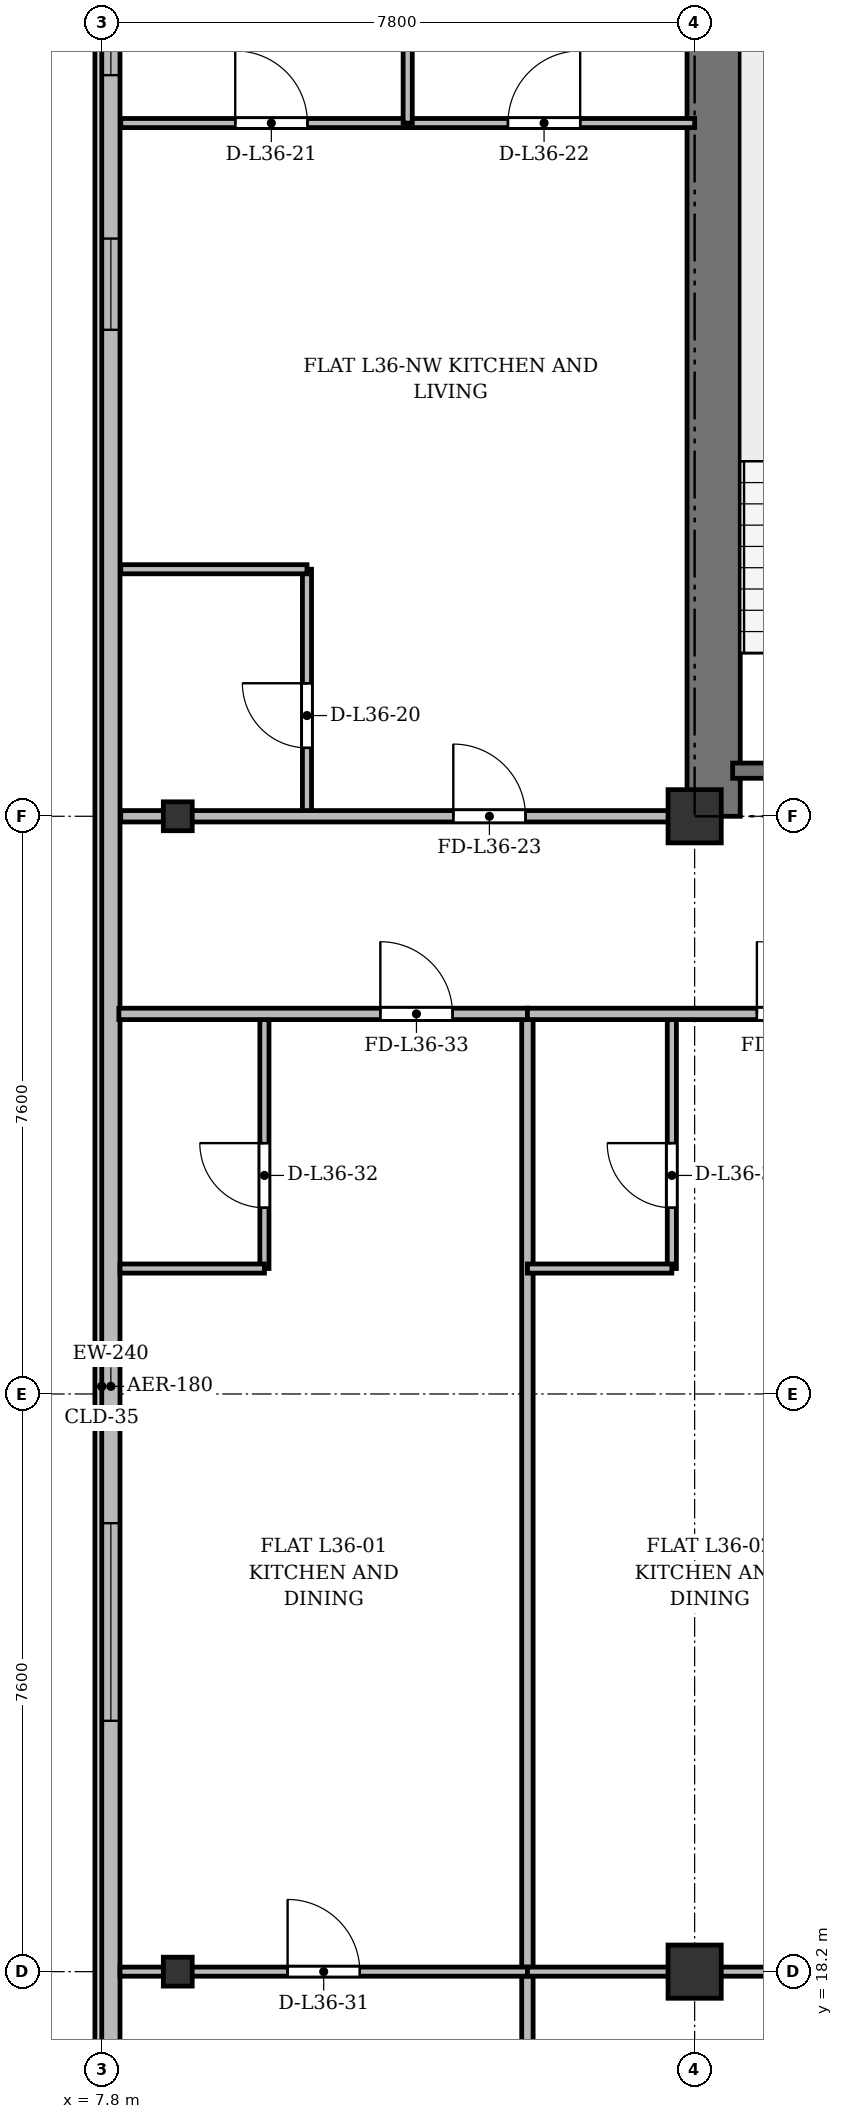
"""IFC4 building model, lengths in metres.
Left out: names, types, materials, properties, quantities, classifications, styles, units other than length and angle.
Written with IfcOpenShell. Run it as: python <this file> out.ifc"""

import sys

from ifc_helpers import new_model, si_unit, direction, frame, frame_2d, origin, origin_2d, place, context, subcontext, project, spatial, rectangle, i_section, extrude, source, transform, mapped, element, fill, save


model = new_model("IFC4")
c1 = context("Model", 3, precision=1e-05, world=origin(), true_north=direction((0.0, 1.0)))
c2 = subcontext(c1, "Body", "Model", "MODEL_VIEW")
j1 = project(units=[si_unit("LENGTHUNIT", "METRE"), si_unit("PLANEANGLEUNIT", "RADIAN")], contexts=[c1])
p1 = place(None, origin())
s1 = spatial("IfcSite", under=j1, at=p1, CompositionType="ELEMENT")
p2 = place(p1, origin())
s2 = spatial("IfcBuilding", under=s1, at=p2, CompositionType="ELEMENT")
p3 = place(p2, frame((0.0, 0.0, 139.3)))
s3 = spatial("IfcBuildingStorey", under=s2, at=p3, CompositionType="ELEMENT", Elevation=139.3)
m1 = source(origin(), c2, "Body", "SweptSolid", [
    extrude(i_section(OverallWidth=0.38, OverallDepth=0.38, WebThickness=0.02, FlangeThickness=0.03, at=origin_2d()), origin(), (0.0, 0.0, 1.0), 3.6),
])
for number, where, z_axis, x_axis in (
    (1, (8.8, 18.2, 0.0), (0.0, 0.0, 1.0), (1.0, 0.0, 0.0)),
    (2, (8.8, 33.4, 0.0), (0.0, 0.0, 1.0), (1.0, 0.0, 0.0)),
):
    element("IfcColumn", number, at=place(p3, frame(where, z_axis=z_axis, x_axis=x_axis)), inside=s3, PredefinedType="COLUMN", context=c2, shape_type="MappedRepresentation", body=[
        mapped(m1, transform((0.0, 0.0, 0.0), x_axis=(1.0, 0.0, 0.0), y_axis=(0.0, 1.0, 0.0), z_axis=(0.0, 0.0, 1.0), scale=1.0)),
    ])
m2 = source(origin(), c2, "Body", "SweptSolid", [
    extrude(rectangle(XDim=0.7, YDim=0.7, at=origin_2d()), origin(), (0.0, 0.0, 1.0), 3.6),
])
for number, where, z_axis, x_axis in (
    (3, (15.6, 18.2, 0.0), (0.0, 0.0, 1.0), (1.0, 0.0, 0.0)),
    (4, (15.6, 33.4, 0.0), (0.0, 0.0, 1.0), (1.0, 0.0, 0.0)),
):
    element("IfcColumn", number, at=place(p3, frame(where, z_axis=z_axis, x_axis=x_axis)), inside=s3, PredefinedType="COLUMN", context=c2, shape_type="MappedRepresentation", body=[
        mapped(m2, transform((0.0, 0.0, 0.0), x_axis=(1.0, 0.0, 0.0), y_axis=(0.0, 1.0, 0.0), z_axis=(0.0, 0.0, 1.0), scale=1.0)),
    ])
p4 = place(p3, frame((7.92, 6.3, 0.0), z_axis=(0.0, 0.0, 1.0), x_axis=(0.0, 1.0, 0.0)))
e5 = element("IfcWall", 5, at=p4, inside=s3, PredefinedType="SOLIDWALL", context=c2, shape_type="SweptSolid", body=[
    extrude(rectangle(XDim=39.2, YDim=0.24, at=frame_2d((19.6, 0.0))), origin(), (0.0, 0.0, 1.0), 3.35),
])
p5 = place(p4, frame((1.45, 0.0, 0.92)))
e6 = element("IfcOpeningElement", 6, at=p5, cuts=e5, PredefinedType="OPENING", context=c2, shape_type="SweptSolid", body=[
    extrude(rectangle(XDim=1.2, YDim=1.65, at=frame_2d((0.6, 0.825))), frame((0.0, 0.13, 0.0), z_axis=(0.0, -1.0, 0.0), x_axis=(1.0, 0.0, 0.0)), (0.0, 0.0, 1.0), 0.26),
])
p6 = place(p4, frame((3.8, 0.0, 0.92)))
e7 = element("IfcOpeningElement", 7, at=p6, cuts=e5, PredefinedType="OPENING", context=c2, shape_type="SweptSolid", body=[
    extrude(rectangle(XDim=2.6, YDim=1.9, at=frame_2d((1.3, 0.95))), frame((0.0, 0.13, 0.0), z_axis=(0.0, -1.0, 0.0), x_axis=(1.0, 0.0, 0.0)), (0.0, 0.0, 1.0), 0.26),
])
p7 = place(p4, frame((8.0, 0.0, 0.92)))
e8 = element("IfcOpeningElement", 8, at=p7, cuts=e5, PredefinedType="OPENING", context=c2, shape_type="SweptSolid", body=[
    extrude(rectangle(XDim=2.6, YDim=1.9, at=frame_2d((1.3, 0.95))), frame((0.0, 0.13, 0.0), z_axis=(0.0, -1.0, 0.0), x_axis=(1.0, 0.0, 0.0)), (0.0, 0.0, 1.0), 0.26),
])
p8 = place(p4, frame((15.2, 0.0, 0.92)))
e9 = element("IfcOpeningElement", 9, at=p8, cuts=e5, PredefinedType="OPENING", context=c2, shape_type="SweptSolid", body=[
    extrude(rectangle(XDim=2.6, YDim=1.9, at=frame_2d((1.3, 0.95))), frame((0.0, 0.13, 0.0), z_axis=(0.0, -1.0, 0.0), x_axis=(1.0, 0.0, 0.0)), (0.0, 0.0, 1.0), 0.26),
])
p9 = place(p4, frame((33.5, 0.0, 0.92)))
e10 = element("IfcOpeningElement", 10, at=p9, cuts=e5, PredefinedType="OPENING", context=c2, shape_type="SweptSolid", body=[
    extrude(rectangle(XDim=1.2, YDim=1.65, at=frame_2d((0.6, 0.825))), frame((0.0, 0.13, 0.0), z_axis=(0.0, -1.0, 0.0), x_axis=(1.0, 0.0, 0.0)), (0.0, 0.0, 1.0), 0.26),
])
p10 = place(p4, frame((36.85, 0.0, 0.92)))
e11 = element("IfcOpeningElement", 11, at=p10, cuts=e5, PredefinedType="OPENING", context=c2, shape_type="SweptSolid", body=[
    extrude(rectangle(XDim=1.2, YDim=1.65, at=frame_2d((0.6, 0.825))), frame((0.0, 0.13, 0.0), z_axis=(0.0, -1.0, 0.0), x_axis=(1.0, 0.0, 0.0)), (0.0, 0.0, 1.0), 0.26),
])
p11 = place(p3, frame((15.85, 33.4, 0.0), z_axis=(0.0, 0.0, 1.0), x_axis=(0.0, 1.0, 0.0)))
e12 = element("IfcWall", 12, at=p11, inside=s3, PredefinedType="SHEAR", context=c2, shape_type="SweptSolid", body=[
    extrude(rectangle(XDim=11.7, YDim=0.7, at=frame_2d((5.85, 0.0))), origin(), (0.0, 0.0, 1.0), 3.35),
])
p12 = place(p3, frame((16.1, 34.0, 0.0), z_axis=(0.0, 0.0, 1.0), x_axis=(1.0, 0.0, 0.0)))
e13 = element("IfcWall", 13, at=p12, inside=s3, PredefinedType="SHEAR", context=c2, shape_type="SweptSolid", body=[
    extrude(rectangle(XDim=3.4, YDim=0.2, at=frame_2d((1.7, 0.0))), origin(), (0.0, 0.0, 1.0), 3.35),
])
p13 = place(p3, frame((10.5, 33.4, 0.0), z_axis=(0.0, 0.0, 1.0), x_axis=(0.0, 1.0, 0.0)))
e14 = element("IfcWall", 14, at=p13, inside=s3, PredefinedType="PARTITIONING", context=c2, shape_type="SweptSolid", body=[
    extrude(rectangle(XDim=3.25, YDim=0.12, at=frame_2d((1.625, 0.0))), origin(), (0.0, 0.0, 1.0), 2.75),
])
p14 = place(p13, frame((0.9, 0.0, 0.0)))
e15 = element("IfcOpeningElement", 15, at=p14, cuts=e14, PredefinedType="OPENING", context=c2, shape_type="SweptSolid", body=[
    extrude(rectangle(XDim=0.85, YDim=2.1, at=frame_2d((0.425, 1.05))), frame((0.0, 0.07, 0.0), z_axis=(0.0, -1.0, 0.0), x_axis=(1.0, 0.0, 0.0)), (0.0, 0.0, 1.0), 0.14),
])
p15 = place(p3, frame((8.05, 36.65, 0.0), z_axis=(0.0, 0.0, 1.0), x_axis=(1.0, 0.0, 0.0)))
e16 = element("IfcWall", 16, at=p15, inside=s3, PredefinedType="PARTITIONING", context=c2, shape_type="SweptSolid", body=[
    extrude(rectangle(XDim=2.45, YDim=0.12, at=frame_2d((1.225, 0.0))), origin(), (0.0, 0.0, 1.0), 2.85),
])
p16 = place(p3, frame((8.05, 42.52, 0.0), z_axis=(0.0, 0.0, 1.0), x_axis=(1.0, 0.0, 0.0)))
e17 = element("IfcWall", 17, at=p16, inside=s3, PredefinedType="PARTITIONING", context=c2, shape_type="SweptSolid", body=[
    extrude(rectangle(XDim=3.775, YDim=0.12, at=frame_2d((1.887, 0.0))), origin(), (0.0, 0.0, 1.0), 2.85),
])
p17 = place(p16, frame((1.506, 0.0, 0.0)))
e18 = element("IfcOpeningElement", 18, at=p17, cuts=e17, PredefinedType="OPENING", context=c2, shape_type="SweptSolid", body=[
    extrude(rectangle(XDim=0.95, YDim=2.15, at=frame_2d((0.475, 1.075))), frame((0.0, 0.07, 0.0), z_axis=(0.0, -1.0, 0.0), x_axis=(1.0, 0.0, 0.0)), (0.0, 0.0, 1.0), 0.14),
])
p18 = place(p3, frame((11.825, 42.52, 0.0), z_axis=(0.0, 0.0, 1.0), x_axis=(1.0, 0.0, 0.0)))
e19 = element("IfcWall", 19, at=p18, inside=s3, PredefinedType="PARTITIONING", context=c2, shape_type="SweptSolid", body=[
    extrude(rectangle(XDim=3.775, YDim=0.12, at=frame_2d((1.888, 0.0))), origin(), (0.0, 0.0, 1.0), 2.85),
])
p19 = place(p18, frame((1.319, 0.0, 0.0)))
e20 = element("IfcOpeningElement", 20, at=p19, cuts=e19, PredefinedType="OPENING", context=c2, shape_type="SweptSolid", body=[
    extrude(rectangle(XDim=0.95, YDim=2.15, at=frame_2d((0.475, 1.075))), frame((0.0, 0.07, 0.0), z_axis=(0.0, -1.0, 0.0), x_axis=(1.0, 0.0, 0.0)), (0.0, 0.0, 1.0), 0.14),
])
p20 = place(p3, frame((11.825, 42.52, 0.0), z_axis=(0.0, 0.0, 1.0), x_axis=(0.0, 1.0, 0.0)))
e21 = element("IfcWall", 21, at=p20, inside=s3, PredefinedType="PARTITIONING", context=c2, shape_type="SweptSolid", body=[
    extrude(rectangle(XDim=5.74, YDim=0.12, at=frame_2d((2.87, 0.0))), origin(), (0.0, 0.0, 1.0), 2.75),
])
p21 = place(p3, frame((8.05, 33.4, 0.0), z_axis=(0.0, 0.0, 1.0), x_axis=(1.0, 0.0, 0.0)))
e22 = element("IfcWall", 22, at=p21, inside=s3, PredefinedType="PARTITIONING", context=c2, shape_type="SweptSolid", body=[
    extrude(rectangle(XDim=7.55, YDim=0.15, at=frame_2d((3.775, 0.0))), origin(), (0.0, 0.0, 1.0), 2.75),
])
p22 = place(p21, frame((4.375, 0.0, 0.0)))
e23 = element("IfcOpeningElement", 23, at=p22, cuts=e22, PredefinedType="OPENING", context=c2, shape_type="SweptSolid", body=[
    extrude(rectangle(XDim=0.95, YDim=2.15, at=frame_2d((0.475, 1.075))), frame((0.0, 0.085, 0.0), z_axis=(0.0, -1.0, 0.0), x_axis=(1.0, 0.0, 0.0)), (0.0, 0.0, 1.0), 0.17),
])
p23 = place(p3, frame((13.4, 3.525, 0.0), z_axis=(0.0, 0.0, 1.0), x_axis=(0.0, 1.0, 0.0)))
e24 = element("IfcWall", 24, at=p23, inside=s3, PredefinedType="PARTITIONING", context=c2, shape_type="SweptSolid", body=[
    extrude(rectangle(XDim=27.275, YDim=0.15, at=frame_2d((13.638, 0.0))), origin(), (0.0, 0.0, 1.0), 2.75),
])
p24 = place(p3, frame((8.04, 18.2, 0.0), z_axis=(0.0, 0.0, 1.0), x_axis=(1.0, 0.0, 0.0)))
e25 = element("IfcWall", 25, at=p24, inside=s3, PredefinedType="PARTITIONING", context=c2, shape_type="SweptSolid", body=[
    extrude(rectangle(XDim=5.36, YDim=0.12, at=frame_2d((2.68, 0.0))), origin(), (0.0, 0.0, 1.0), 2.75),
])
p25 = place(p24, frame((2.205, 0.0, 0.0)))
e26 = element("IfcOpeningElement", 26, at=p25, cuts=e25, PredefinedType="OPENING", context=c2, shape_type="SweptSolid", body=[
    extrude(rectangle(XDim=0.95, YDim=2.15, at=frame_2d((0.475, 1.075))), frame((0.0, 0.07, 0.0), z_axis=(0.0, -1.0, 0.0), x_axis=(1.0, 0.0, 0.0)), (0.0, 0.0, 1.0), 0.14),
])
p26 = place(p3, frame((9.94, 27.45, 0.0), z_axis=(0.0, 0.0, 1.0), x_axis=(0.0, 1.0, 0.0)))
e27 = element("IfcWall", 27, at=p26, inside=s3, PredefinedType="PARTITIONING", context=c2, shape_type="SweptSolid", body=[
    extrude(rectangle(XDim=3.35, YDim=0.12, at=frame_2d((1.675, 0.0))), origin(), (0.0, 0.0, 1.0), 3.35),
])
p27 = place(p26, frame((0.8, 0.0, 0.0)))
e28 = element("IfcOpeningElement", 28, at=p27, cuts=e27, PredefinedType="OPENING", context=c2, shape_type="SweptSolid", body=[
    extrude(rectangle(XDim=0.85, YDim=2.1, at=frame_2d((0.425, 1.05))), frame((0.0, 0.07, 0.0), z_axis=(0.0, -1.0, 0.0), x_axis=(1.0, 0.0, 0.0)), (0.0, 0.0, 1.0), 0.14),
])
p28 = place(p3, frame((8.04, 27.45, 0.0), z_axis=(0.0, 0.0, 1.0), x_axis=(1.0, 0.0, 0.0)))
e29 = element("IfcWall", 29, at=p28, inside=s3, PredefinedType="PARTITIONING", context=c2, shape_type="SweptSolid", body=[
    extrude(rectangle(XDim=1.9, YDim=0.12, at=frame_2d((0.95, 0.0))), origin(), (0.0, 0.0, 1.0), 2.85),
])
p29 = place(p3, frame((8.025, 30.8, 0.0), z_axis=(0.0, 0.0, 1.0), x_axis=(1.0, 0.0, 0.0)))
e30 = element("IfcWall", 30, at=p29, inside=s3, PredefinedType="PARTITIONING", context=c2, shape_type="SweptSolid", body=[
    extrude(rectangle(XDim=5.375, YDim=0.15, at=frame_2d((2.688, 0.0))), origin(), (0.0, 0.0, 1.0), 2.85),
])
p30 = place(p29, frame((3.44, 0.0, 0.0)))
e31 = element("IfcOpeningElement", 31, at=p30, cuts=e30, PredefinedType="OPENING", context=c2, shape_type="SweptSolid", body=[
    extrude(rectangle(XDim=0.95, YDim=2.15, at=frame_2d((0.475, 1.075))), frame((0.0, 0.085, 0.0), z_axis=(0.0, -1.0, 0.0), x_axis=(1.0, 0.0, 0.0)), (0.0, 0.0, 1.0), 0.17),
])
p31 = place(p3, frame((13.4, 18.2, 0.0), z_axis=(0.0, 0.0, 1.0), x_axis=(1.0, 0.0, 0.0)))
e32 = element("IfcWall", 32, at=p31, inside=s3, PredefinedType="PARTITIONING", context=c2, shape_type="SweptSolid", body=[
    extrude(rectangle(XDim=4.8, YDim=0.12, at=frame_2d((2.4, 0.0))), origin(), (0.0, 0.0, 1.0), 2.75),
])
p32 = place(p31, frame((3.288, 0.0, 0.0)))
e33 = element("IfcOpeningElement", 33, at=p32, cuts=e32, PredefinedType="OPENING", context=c2, shape_type="SweptSolid", body=[
    extrude(rectangle(XDim=0.95, YDim=2.15, at=frame_2d((0.475, 1.075))), frame((0.0, 0.07, 0.0), z_axis=(0.0, -1.0, 0.0), x_axis=(1.0, 0.0, 0.0)), (0.0, 0.0, 1.0), 0.14),
])
p33 = place(p3, frame((15.3, 27.45, 0.0), z_axis=(0.0, 0.0, 1.0), x_axis=(0.0, 1.0, 0.0)))
e34 = element("IfcWall", 34, at=p33, inside=s3, PredefinedType="PARTITIONING", context=c2, shape_type="SweptSolid", body=[
    extrude(rectangle(XDim=3.35, YDim=0.12, at=frame_2d((1.675, 0.0))), origin(), (0.0, 0.0, 1.0), 3.35),
])
p34 = place(p33, frame((0.8, 0.0, 0.0)))
e35 = element("IfcOpeningElement", 35, at=p34, cuts=e34, PredefinedType="OPENING", context=c2, shape_type="SweptSolid", body=[
    extrude(rectangle(XDim=0.85, YDim=2.1, at=frame_2d((0.425, 1.05))), frame((0.0, 0.07, 0.0), z_axis=(0.0, -1.0, 0.0), x_axis=(1.0, 0.0, 0.0)), (0.0, 0.0, 1.0), 0.14),
])
p35 = place(p3, frame((13.4, 27.45, 0.0), z_axis=(0.0, 0.0, 1.0), x_axis=(1.0, 0.0, 0.0)))
e36 = element("IfcWall", 36, at=p35, inside=s3, PredefinedType="PARTITIONING", context=c2, shape_type="SweptSolid", body=[
    extrude(rectangle(XDim=1.9, YDim=0.12, at=frame_2d((0.95, 0.0))), origin(), (0.0, 0.0, 1.0), 3.35),
])
p36 = place(p3, frame((13.4, 30.8, 0.0), z_axis=(0.0, 0.0, 1.0), x_axis=(1.0, 0.0, 0.0)))
e37 = element("IfcWall", 37, at=p36, inside=s3, PredefinedType="PARTITIONING", context=c2, shape_type="SweptSolid", body=[
    extrude(rectangle(XDim=4.8, YDim=0.15, at=frame_2d((2.4, 0.0))), origin(), (0.0, 0.0, 1.0), 2.85),
])
p37 = place(p36, frame((3.019, 0.0, 0.0)))
e38 = element("IfcOpeningElement", 38, at=p37, cuts=e37, PredefinedType="OPENING", context=c2, shape_type="SweptSolid", body=[
    extrude(rectangle(XDim=0.95, YDim=2.15, at=frame_2d((0.475, 1.075))), frame((0.0, 0.085, 0.0), z_axis=(0.0, -1.0, 0.0), x_axis=(1.0, 0.0, 0.0)), (0.0, 0.0, 1.0), 0.17),
])
m3 = source(origin(), c2, "Body", "SweptSolid", [
    extrude(rectangle(XDim=2.6, YDim=1.9, at=frame_2d((1.3, 0.95))), frame((0.0, 0.03, 0.0), z_axis=(0.0, -1.0, 0.0), x_axis=(1.0, 0.0, 0.0)), (0.0, 0.0, 1.0), 0.06),
])
p38 = place(p8, origin())
e39 = element("IfcWindow", 39, at=p38, inside=s3, PartitioningType="SINGLE_PANEL", PredefinedType="WINDOW", context=c2, shape_type="MappedRepresentation", body=[
    mapped(m3, transform((0.0, 0.0, 0.0), x_axis=(1.0, 0.0, 0.0), y_axis=(0.0, 1.0, 0.0), z_axis=(0.0, 0.0, 1.0), scale=1.0)),
])
fill(e9, e39)
m4 = source(origin(), c2, "Body", "SweptSolid", [
    extrude(rectangle(XDim=1.2, YDim=1.65, at=frame_2d((0.6, 0.825))), frame((0.0, 0.03, 0.0), z_axis=(0.0, -1.0, 0.0), x_axis=(1.0, 0.0, 0.0)), (0.0, 0.0, 1.0), 0.06),
])
p39 = place(p9, origin())
e40 = element("IfcWindow", 40, at=p39, inside=s3, PartitioningType="SINGLE_PANEL", PredefinedType="WINDOW", context=c2, shape_type="MappedRepresentation", body=[
    mapped(m4, transform((0.0, 0.0, 0.0), x_axis=(1.0, 0.0, 0.0), y_axis=(0.0, 1.0, 0.0), z_axis=(0.0, 0.0, 1.0), scale=1.0)),
])
fill(e10, e40)
p40 = place(p10, origin())
e41 = element("IfcWindow", 41, at=p40, inside=s3, PartitioningType="SINGLE_PANEL", PredefinedType="WINDOW", context=c2, shape_type="MappedRepresentation", body=[
    mapped(m4, transform((0.0, 0.0, 0.0), x_axis=(1.0, 0.0, 0.0), y_axis=(0.0, 1.0, 0.0), z_axis=(0.0, 0.0, 1.0), scale=1.0)),
])
fill(e11, e41)
m5 = source(origin(), c2, "Body", "SweptSolid", [
    extrude(rectangle(XDim=0.85, YDim=2.1, at=frame_2d((0.425, 1.05))), frame((0.0, 0.025, 0.0), z_axis=(0.0, -1.0, 0.0), x_axis=(1.0, 0.0, 0.0)), (0.0, 0.0, 1.0), 0.05),
])
p41 = place(p14, origin())
e42 = element("IfcDoor", 42, at=p41, inside=s3, OperationType="SINGLE_SWING_RIGHT", PredefinedType="DOOR", context=c2, shape_type="MappedRepresentation", body=[
    mapped(m5, transform((0.0, 0.0, 0.0), x_axis=(1.0, 0.0, 0.0), y_axis=(0.0, 1.0, 0.0), z_axis=(0.0, 0.0, 1.0), scale=1.0)),
])
fill(e15, e42)
m6 = source(origin(), c2, "Body", "SweptSolid", [
    extrude(rectangle(XDim=0.95, YDim=2.15, at=frame_2d((0.475, 1.075))), frame((0.0, 0.025, 0.0), z_axis=(0.0, -1.0, 0.0), x_axis=(1.0, 0.0, 0.0)), (0.0, 0.0, 1.0), 0.05),
])
p42 = place(p17, origin())
e43 = element("IfcDoor", 43, at=p42, inside=s3, OperationType="SINGLE_SWING_LEFT", PredefinedType="DOOR", context=c2, shape_type="MappedRepresentation", body=[
    mapped(m6, transform((0.0, 0.0, 0.0), x_axis=(1.0, 0.0, 0.0), y_axis=(0.0, 1.0, 0.0), z_axis=(0.0, 0.0, 1.0), scale=1.0)),
])
fill(e18, e43)
p43 = place(p19, origin())
e44 = element("IfcDoor", 44, at=p43, inside=s3, OperationType="SINGLE_SWING_RIGHT", PredefinedType="DOOR", context=c2, shape_type="MappedRepresentation", body=[
    mapped(m6, transform((0.0, 0.0, 0.0), x_axis=(1.0, 0.0, 0.0), y_axis=(0.0, 1.0, 0.0), z_axis=(0.0, 0.0, 1.0), scale=1.0)),
])
fill(e20, e44)
p44 = place(p22, origin())
e45 = element("IfcDoor", 45, at=p44, inside=s3, OperationType="SINGLE_SWING_LEFT", PredefinedType="DOOR", context=c2, shape_type="MappedRepresentation", body=[
    mapped(m6, transform((0.0, 0.0, 0.0), x_axis=(1.0, 0.0, 0.0), y_axis=(0.0, 1.0, 0.0), z_axis=(0.0, 0.0, 1.0), scale=1.0)),
])
fill(e23, e45)
p45 = place(p25, origin())
e46 = element("IfcDoor", 46, at=p45, inside=s3, OperationType="SINGLE_SWING_LEFT", PredefinedType="DOOR", context=c2, shape_type="MappedRepresentation", body=[
    mapped(m6, transform((0.0, 0.0, 0.0), x_axis=(1.0, 0.0, 0.0), y_axis=(0.0, 1.0, 0.0), z_axis=(0.0, 0.0, 1.0), scale=1.0)),
])
fill(e26, e46)
p46 = place(p27, origin())
e47 = element("IfcDoor", 47, at=p46, inside=s3, OperationType="SINGLE_SWING_RIGHT", PredefinedType="DOOR", context=c2, shape_type="MappedRepresentation", body=[
    mapped(m5, transform((0.0, 0.0, 0.0), x_axis=(1.0, 0.0, 0.0), y_axis=(0.0, 1.0, 0.0), z_axis=(0.0, 0.0, 1.0), scale=1.0)),
])
fill(e28, e47)
p47 = place(p30, origin())
e48 = element("IfcDoor", 48, at=p47, inside=s3, OperationType="SINGLE_SWING_LEFT", PredefinedType="DOOR", context=c2, shape_type="MappedRepresentation", body=[
    mapped(m6, transform((0.0, 0.0, 0.0), x_axis=(1.0, 0.0, 0.0), y_axis=(0.0, 1.0, 0.0), z_axis=(0.0, 0.0, 1.0), scale=1.0)),
])
fill(e31, e48)
p48 = place(p34, origin())
e49 = element("IfcDoor", 49, at=p48, inside=s3, OperationType="SINGLE_SWING_RIGHT", PredefinedType="DOOR", context=c2, shape_type="MappedRepresentation", body=[
    mapped(m5, transform((0.0, 0.0, 0.0), x_axis=(1.0, 0.0, 0.0), y_axis=(0.0, 1.0, 0.0), z_axis=(0.0, 0.0, 1.0), scale=1.0)),
])
fill(e35, e49)
p49 = place(p37, origin())
e50 = element("IfcDoor", 50, at=p49, inside=s3, OperationType="SINGLE_SWING_LEFT", PredefinedType="DOOR", context=c2, shape_type="MappedRepresentation", body=[
    mapped(m6, transform((0.0, 0.0, 0.0), x_axis=(1.0, 0.0, 0.0), y_axis=(0.0, 1.0, 0.0), z_axis=(0.0, 0.0, 1.0), scale=1.0)),
])
fill(e38, e50)
save(model, sys.argv[1])
